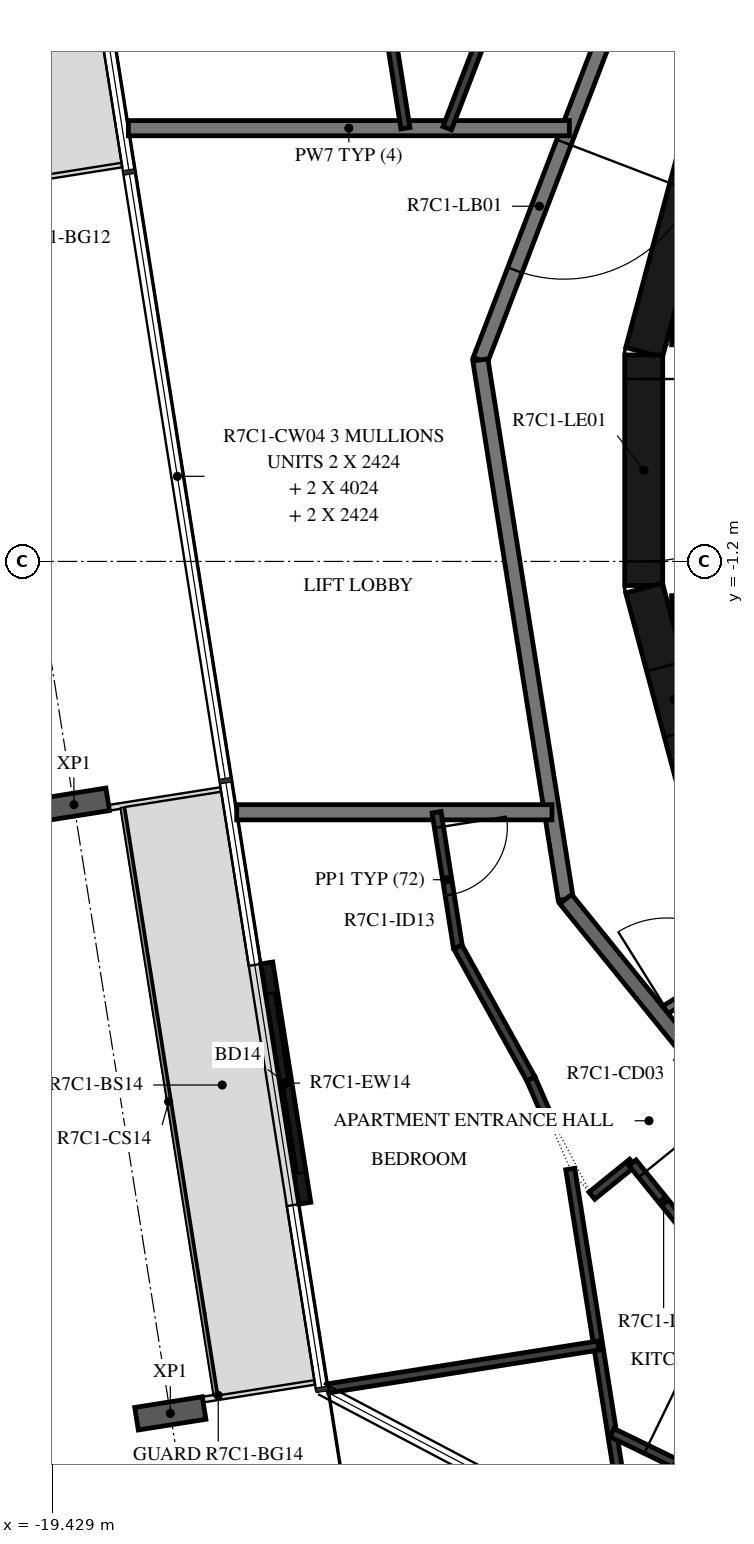
"""IFC4 building model, lengths in metres.
Left out: names, types, materials, properties, quantities, classifications, styles, units other than length and angle.
Written with IfcOpenShell. Run it as: python <this file> out.ifc"""

import sys

from ifc_helpers import new_model, si_unit, direction, frame, frame_2d, origin, origin_2d, place, context, subcontext, project, spatial, rectangle, i_section, extrude, element, fill, save


model = new_model("IFC4")
c1 = context("Model", 3, precision=1e-05, world=origin(), true_north=direction((0.0, 1.0)))
c2 = subcontext(c1, "Body", "Model", "MODEL_VIEW")
j1 = project(units=[si_unit("LENGTHUNIT", "METRE"), si_unit("PLANEANGLEUNIT", "RADIAN")], contexts=[c1])
p1 = place(None, origin())
s1 = spatial("IfcSite", under=j1, at=p1, CompositionType="ELEMENT")
p2 = place(p1, origin())
s2 = spatial("IfcBuilding", under=s1, at=p2, CompositionType="ELEMENT")
p3 = place(p2, frame((0.0, 0.0, 287.9)))
s3 = spatial("IfcBuildingStorey", under=s2, at=p3, CompositionType="ELEMENT", Elevation=287.9)
for number, where, z_axis, x_axis in (
    (1, (-19.144, -4.4, -0.38), (0.0, 0.0, 1.0), (-0.156, 0.988, 0.0)),
    (2, (-17.875, -12.408, -0.38), (0.0, 0.0, 1.0), (-0.156, 0.988, 0.0)),
):
    element("IfcColumn", number, at=place(p3, frame(where, z_axis=z_axis, x_axis=x_axis)), inside=s3, PredefinedType="COLUMN", context=c2, shape_type="SweptSolid", body=[
        extrude(i_section(OverallWidth=0.3, OverallDepth=0.9, WebThickness=0.019, FlangeThickness=0.035, FilletRadius=0.03, at=origin_2d()), origin(), (0.0, 0.0, 1.0), 2.616),
    ])
p4 = place(p3, frame((-16.607, -6.483, 0.0), z_axis=(0.0, 0.0, 1.0), x_axis=(0.156401347891, -0.987693585267, 0.0)))
e3 = element("IfcWall", 3, at=p4, inside=s3, PredefinedType="STANDARD", context=c2, shape_type="SweptSolid", body=[
    extrude(rectangle(XDim=3.2, YDim=0.16, at=frame_2d((1.6, 0.0))), origin(), (0.0, 0.0, 1.0), 3.05),
])
p5 = place(p4, frame((0.4, 0.0, 0.0)))
e4 = element("IfcOpeningElement", 4, at=p5, cuts=e3, PredefinedType="OPENING", context=c2, shape_type="SweptSolid", body=[
    extrude(rectangle(XDim=2.4, YDim=2.4, at=frame_2d((1.2, 1.2))), frame((0.0, 0.09, 0.0), z_axis=(0.0, -1.0, 0.0), x_axis=(1.0, 0.0, 0.0)), (0.0, 0.0, 1.0), 0.18),
])
p6 = place(p3, frame((-10.858, 4.479, 0.0), z_axis=(0.0, 0.0, 1.0), x_axis=(-0.258734743916, -0.965948410781, 0.0)))
e5 = element("IfcWall", 5, at=p6, inside=s3, PredefinedType="SHEAR", context=c2, shape_type="SweptSolid", body=[
    extrude(rectangle(XDim=3.033, YDim=0.5, at=frame_2d((1.516, 0.0))), origin(), (0.0, 0.0, 1.0), 3.05),
])
p7 = place(p3, frame((-11.647, 1.516, 0.0), z_axis=(0.0, 0.0, 1.0), x_axis=(0.0, -1.0, 0.0)))
e6 = element("IfcWall", 6, at=p7, inside=s3, PredefinedType="SHEAR", context=c2, shape_type="SweptSolid", body=[
    extrude(rectangle(XDim=3.033, YDim=0.5, at=frame_2d((1.516, 0.0))), origin(), (0.0, 0.0, 1.0), 3.05),
])
p8 = place(p7, frame((0.316, 0.0, 0.0)))
e7 = element("IfcOpeningElement", 7, at=p8, cuts=e6, PredefinedType="OPENING", context=c2, shape_type="SweptSolid", body=[
    extrude(rectangle(XDim=2.4, YDim=2.1, at=frame_2d((1.2, 1.05))), frame((0.0, 0.26, 0.0), z_axis=(0.0, -1.0, 0.0), x_axis=(1.0, 0.0, 0.0)), (0.0, 0.0, 1.0), 0.52),
])
p9 = place(p3, frame((-11.643, -1.55, 0.0), z_axis=(0.0, 0.0, 1.0), x_axis=(0.258734743916, -0.965948410781, 0.0)))
e8 = element("IfcWall", 8, at=p9, inside=s3, PredefinedType="SHEAR", context=c2, shape_type="SweptSolid", body=[
    extrude(rectangle(XDim=3.033, YDim=0.5, at=frame_2d((1.516, 0.0))), origin(), (0.0, 0.0, 1.0), 3.05),
])
p10 = place(p9, frame((1.066, 0.0, 0.0)))
e9 = element("IfcOpeningElement", 9, at=p10, cuts=e8, PredefinedType="OPENING", context=c2, shape_type="SweptSolid", body=[
    extrude(rectangle(XDim=0.9, YDim=2.1, at=frame_2d((0.45, 1.05))), frame((0.0, 0.26, 0.0), z_axis=(0.0, -1.0, 0.0), x_axis=(1.0, 0.0, 0.0)), (0.0, 0.0, 1.0), 0.52),
])
p11 = place(p3, frame((-11.28, 1.775, 0.0), z_axis=(0.0, 0.0, 1.0), x_axis=(1.0, 0.0, 0.0)))
e10 = element("IfcWall", 10, at=p11, inside=s3, PredefinedType="SHEAR", context=c2, shape_type="SweptSolid", body=[
    extrude(rectangle(XDim=14.38, YDim=0.25, at=frame_2d((7.19, 0.0))), origin(), (0.0, 0.0, 1.0), 3.05),
])
p12 = place(p11, frame((3.305, 0.0, 0.0)))
e11 = element("IfcOpeningElement", 11, at=p12, cuts=e10, PredefinedType="OPENING", context=c2, shape_type="SweptSolid", body=[
    extrude(rectangle(XDim=0.9, YDim=2.1, at=frame_2d((0.45, 1.05))), frame((0.0, 0.135, 0.0), z_axis=(0.0, -1.0, 0.0), x_axis=(1.0, 0.0, 0.0)), (0.0, 0.0, 1.0), 0.27),
])
p13 = place(p11, frame((9.755, 0.0, 0.0)))
e12 = element("IfcOpeningElement", 12, at=p13, cuts=e10, PredefinedType="OPENING", context=c2, shape_type="SweptSolid", body=[
    extrude(rectangle(XDim=0.9, YDim=2.1, at=frame_2d((0.45, 1.05))), frame((0.0, 0.135, 0.0), z_axis=(0.0, -1.0, 0.0), x_axis=(1.0, 0.0, 0.0)), (0.0, 0.0, 1.0), 0.27),
])
p14 = place(p3, frame((-11.28, -1.775, 0.0), z_axis=(0.0, 0.0, 1.0), x_axis=(1.0, 0.0, 0.0)))
e13 = element("IfcWall", 13, at=p14, inside=s3, PredefinedType="SHEAR", context=c2, shape_type="SweptSolid", body=[
    extrude(rectangle(XDim=14.38, YDim=0.25, at=frame_2d((7.19, 0.0))), origin(), (0.0, 0.0, 1.0), 3.05),
])
p15 = place(p14, frame((6.43, 0.0, 0.0)))
e14 = element("IfcOpeningElement", 14, at=p15, cuts=e13, PredefinedType="OPENING", context=c2, shape_type="SweptSolid", body=[
    extrude(rectangle(XDim=1.1, YDim=2.1, at=frame_2d((0.55, 1.05))), frame((0.0, 0.135, 0.0), z_axis=(0.0, -1.0, 0.0), x_axis=(1.0, 0.0, 0.0)), (0.0, 0.0, 1.0), 0.27),
])
p16 = place(p14, frame((8.58, 0.0, 0.0)))
e15 = element("IfcOpeningElement", 15, at=p16, cuts=e13, PredefinedType="OPENING", context=c2, shape_type="SweptSolid", body=[
    extrude(rectangle(XDim=1.1, YDim=2.1, at=frame_2d((0.55, 1.05))), frame((0.0, 0.135, 0.0), z_axis=(0.0, -1.0, 0.0), x_axis=(1.0, 0.0, 0.0)), (0.0, 0.0, 1.0), 0.27),
])
p17 = place(p14, frame((10.73, 0.0, 0.0)))
e16 = element("IfcOpeningElement", 16, at=p17, cuts=e13, PredefinedType="OPENING", context=c2, shape_type="SweptSolid", body=[
    extrude(rectangle(XDim=1.1, YDim=2.1, at=frame_2d((0.55, 1.05))), frame((0.0, 0.135, 0.0), z_axis=(0.0, -1.0, 0.0), x_axis=(1.0, 0.0, 0.0)), (0.0, 0.0, 1.0), 0.27),
])
p18 = place(p14, frame((3.305, 0.0, 0.0)))
e17 = element("IfcOpeningElement", 17, at=p18, cuts=e13, PredefinedType="OPENING", context=c2, shape_type="SweptSolid", body=[
    extrude(rectangle(XDim=0.9, YDim=2.1, at=frame_2d((0.45, 1.05))), frame((0.0, 0.135, 0.0), z_axis=(0.0, -1.0, 0.0), x_axis=(1.0, 0.0, 0.0)), (0.0, 0.0, 1.0), 0.27),
])
p19 = place(p14, frame((12.98, 0.0, 0.0)))
e18 = element("IfcOpeningElement", 18, at=p19, cuts=e13, PredefinedType="OPENING", context=c2, shape_type="SweptSolid", body=[
    extrude(rectangle(XDim=0.9, YDim=2.1, at=frame_2d((0.45, 1.05))), frame((0.0, 0.135, 0.0), z_axis=(0.0, -1.0, 0.0), x_axis=(1.0, 0.0, 0.0)), (0.0, 0.0, 1.0), 0.27),
])
p20 = place(p3, frame((-11.449, -7.154, 0.0), z_axis=(0.0, 0.0, 1.0), x_axis=(0.848067047543, 0.529888934468, 0.0)))
e19 = element("IfcWall", 19, at=p20, inside=s3, PredefinedType="PARTITIONING", context=c2, shape_type="SweptSolid", body=[
    extrude(rectangle(XDim=1.596, YDim=0.12, at=frame_2d((0.798, 0.0))), origin(), (0.0, 0.0, 1.0), 3.05),
])
p21 = place(p20, frame((0.12, 0.0, 0.0)))
e20 = element("IfcOpeningElement", 20, at=p21, cuts=e19, PredefinedType="OPENING", context=c2, shape_type="SweptSolid", body=[
    extrude(rectangle(XDim=1.2, YDim=2.1, at=frame_2d((0.6, 1.05))), frame((0.0, 0.07, 0.0), z_axis=(0.0, -1.0, 0.0), x_axis=(1.0, 0.0, 0.0)), (0.0, 0.0, 1.0), 0.14),
])
p22 = place(p3, frame((-11.223, 8.154, 0.0), z_axis=(0.0, 0.0, 1.0), x_axis=(-0.358341090983, -0.93359073609, 0.0)))
e21 = element("IfcWall", 21, at=p22, inside=s3, PredefinedType="STANDARD", context=c2, shape_type="SweptSolid", body=[
    extrude(rectangle(XDim=7.181, YDim=0.2, at=frame_2d((3.59, 0.0))), origin(), (0.0, 0.0, 1.0), 3.05),
])
p23 = place(p22, frame((4.114, 0.0, 0.0)))
e22 = element("IfcOpeningElement", 22, at=p23, cuts=e21, PredefinedType="OPENING", context=c2, shape_type="SweptSolid", body=[
    extrude(rectangle(XDim=1.8, YDim=2.1, at=frame_2d((0.9, 1.05))), frame((0.0, 0.11, 0.0), z_axis=(0.0, -1.0, 0.0), x_axis=(1.0, 0.0, 0.0)), (0.0, 0.0, 1.0), 0.22),
])
p24 = place(p3, frame((-13.797, 1.45, 0.0), z_axis=(0.0, 0.0, 1.0), x_axis=(0.156421704315, -0.987690361611, 0.0)))
e23 = element("IfcWall", 23, at=p24, inside=s3, PredefinedType="STANDARD", context=c2, shape_type="SweptSolid", body=[
    extrude(rectangle(XDim=7.181, YDim=0.2, at=frame_2d((3.591, 0.0))), origin(), (0.0, 0.0, 1.0), 3.05),
])
p25 = place(p3, frame((-12.673, -5.643, 0.0), z_axis=(0.0, 0.0, 1.0), x_axis=(0.629302871585, -0.777160148113, 0.0)))
e24 = element("IfcWall", 24, at=p25, inside=s3, PredefinedType="STANDARD", context=c2, shape_type="SweptSolid", body=[
    extrude(rectangle(XDim=7.181, YDim=0.2, at=frame_2d((3.59, 0.0))), origin(), (0.0, 0.0, 1.0), 3.05),
])
p26 = place(p3, frame((-12.626, 4.5, 0.0), z_axis=(0.0, 0.0, 1.0), x_axis=(-1.0, 0.0, 0.0)))
e25 = element("IfcWall", 25, at=p26, inside=s3, PredefinedType="STANDARD", context=c2, shape_type="SweptSolid", body=[
    extrude(rectangle(XDim=5.802, YDim=0.2, at=frame_2d((2.901, 0.0))), origin(), (0.0, 0.0, 1.0), 3.05),
])
p27 = place(p3, frame((-17.002, -4.5, 0.0), z_axis=(0.0, 0.0, 1.0), x_axis=(1.0, 0.0, 0.0)))
e26 = element("IfcWall", 26, at=p27, inside=s3, PredefinedType="STANDARD", context=c2, shape_type="SweptSolid", body=[
    extrude(rectangle(XDim=4.148, YDim=0.2, at=frame_2d((2.074, 0.0))), origin(), (0.0, 0.0, 1.0), 3.05),
])
p28 = place(p3, frame((-12.479, 9.067, 0.0), z_axis=(0.0, 0.0, 1.0), x_axis=(-0.358387060848, -0.933573090131, 0.0)))
e27 = element("IfcWall", 27, at=p28, inside=s3, PredefinedType="PARTITIONING", context=c2, shape_type="SweptSolid", body=[
    extrude(rectangle(XDim=4.892, YDim=0.12, at=frame_2d((2.446, 0.0))), origin(), (0.0, 0.0, 1.0), 3.05),
])
p29 = place(p3, frame((-16.266, 13.865, 0.0), z_axis=(0.0, 0.0, 1.0), x_axis=(0.156422690833, -0.987690205374, 0.0)))
e28 = element("IfcWall", 28, at=p29, inside=s3, PredefinedType="PARTITIONING", context=c2, shape_type="SweptSolid", body=[
    extrude(rectangle(XDim=9.482, YDim=0.12, at=frame_2d((4.741, 0.0))), origin(), (0.0, 0.0, 1.0), 3.05),
])
p30 = place(p29, frame((3.357, 0.0, 0.0)))
e29 = element("IfcOpeningElement", 29, at=p30, cuts=e28, PredefinedType="OPENING", context=c2, shape_type="SweptSolid", body=[
    extrude(rectangle(XDim=0.9, YDim=2.1, at=frame_2d((0.45, 1.05))), frame((0.0, 0.07, 0.0), z_axis=(0.0, -1.0, 0.0), x_axis=(1.0, 0.0, 0.0)), (0.0, 0.0, 1.0), 0.14),
])
p31 = place(p3, frame((-14.373, -4.5, 0.0), z_axis=(0.0, 0.0, 1.0), x_axis=(0.156437152886, -0.987687914878, 0.0)))
e30 = element("IfcWall", 30, at=p31, inside=s3, PredefinedType="PARTITIONING", context=c2, shape_type="SweptSolid", body=[
    extrude(rectangle(XDim=1.796, YDim=0.12, at=frame_2d((0.898, 0.0))), origin(), (0.0, 0.0, 1.0), 3.05),
])
p32 = place(p31, frame((0.2, 0.0, 0.0)))
e31 = element("IfcOpeningElement", 31, at=p32, cuts=e30, PredefinedType="OPENING", context=c2, shape_type="SweptSolid", body=[
    extrude(rectangle(XDim=0.9, YDim=2.1, at=frame_2d((0.45, 1.05))), frame((0.0, 0.07, 0.0), z_axis=(0.0, -1.0, 0.0), x_axis=(1.0, 0.0, 0.0)), (0.0, 0.0, 1.0), 0.14),
])
p33 = place(p3, frame((-14.092, -6.274, 0.0), z_axis=(0.0, 0.0, 1.0), x_axis=(0.484732033151, -0.87466270987, 0.0)))
e32 = element("IfcWall", 32, at=p33, inside=s3, PredefinedType="PARTITIONING", context=c2, shape_type="SweptSolid", body=[
    extrude(rectangle(XDim=1.98, YDim=0.12, at=frame_2d((0.99, 0.0))), origin(), (0.0, 0.0, 1.0), 3.05),
])
p34 = place(p3, frame((-13.132, -8.006, 0.0), z_axis=(0.0, 0.0, 1.0), x_axis=(0.400176548656, -0.916438066596, 0.0)))
e33 = element("IfcWall", 33, at=p34, inside=s3, PredefinedType="PARTITIONING", context=c2, shape_type="SweptSolid", body=[
    extrude(rectangle(XDim=0.578, YDim=0.12, at=frame_2d((0.289, 0.0))), origin(), (0.0, 0.0, 1.0), 3.05),
])
p35 = place(p3, frame((-12.33, -9.544, 0.0), z_axis=(0.0, 0.0, 1.0), x_axis=(0.777046524115, 0.629443166109, 0.0)))
e34 = element("IfcWall", 34, at=p35, inside=s3, PredefinedType="PARTITIONING", context=c2, shape_type="SweptSolid", body=[
    extrude(rectangle(XDim=0.688, YDim=0.12, at=frame_2d((0.344, 0.0))), origin(), (0.0, 0.0, 1.0), 3.05),
])
p36 = place(p3, frame((-11.795, -9.111, 0.0), z_axis=(0.0, 0.0, 1.0), x_axis=(0.62936834401, -0.777107127466, 0.0)))
e35 = element("IfcWall", 35, at=p36, inside=s3, PredefinedType="PARTITIONING", context=c2, shape_type="SweptSolid", body=[
    extrude(rectangle(XDim=4.334, YDim=0.12, at=frame_2d((2.167, 0.0))), origin(), (0.0, 0.0, 1.0), 3.05),
])
p37 = place(p36, frame((0.2, 0.0, 0.0)))
e36 = element("IfcOpeningElement", 36, at=p37, cuts=e35, PredefinedType="OPENING", context=c2, shape_type="SweptSolid", body=[
    extrude(rectangle(XDim=0.9, YDim=2.1, at=frame_2d((0.45, 1.05))), frame((0.0, 0.07, 0.0), z_axis=(0.0, -1.0, 0.0), x_axis=(1.0, 0.0, 0.0)), (0.0, 0.0, 1.0), 0.14),
])
p38 = place(p3, frame((-11.185, -18.213, 0.0), z_axis=(0.0, 0.0, 1.0), x_axis=(-0.15642108221, 0.987690460134, 0.0)))
e37 = element("IfcWall", 37, at=p38, inside=s3, PredefinedType="PARTITIONING", context=c2, shape_type="SweptSolid", body=[
    extrude(rectangle(XDim=9.132, YDim=0.12, at=frame_2d((4.566, 0.0))), origin(), (0.0, 0.0, 1.0), 3.05),
])
p39 = place(p38, frame((1.781, 0.0, 0.0)))
e38 = element("IfcOpeningElement", 38, at=p39, cuts=e37, PredefinedType="OPENING", context=c2, shape_type="SweptSolid", body=[
    extrude(rectangle(XDim=0.9, YDim=2.1, at=frame_2d((0.45, 1.05))), frame((0.0, 0.07, 0.0), z_axis=(0.0, -1.0, 0.0), x_axis=(1.0, 0.0, 0.0)), (0.0, 0.0, 1.0), 0.14),
])
p40 = place(p3, frame((-15.802, -12.08, 0.0), z_axis=(0.0, 0.0, 1.0), x_axis=(0.987685312069, 0.156453585206, 0.0)))
e39 = element("IfcWall", 39, at=p40, inside=s3, PredefinedType="PARTITIONING", context=c2, shape_type="SweptSolid", body=[
    extrude(rectangle(XDim=3.6, YDim=0.12, at=frame_2d((1.8, 0.0))), origin(), (0.0, 0.0, 1.0), 3.05),
])
p41 = place(p3, frame((-12.064, -12.662, 0.0), z_axis=(0.0, 0.0, 1.0), x_axis=(0.899383852228, -0.437159794985, 0.0)))
e40 = element("IfcWall", 40, at=p41, inside=s3, PredefinedType="PARTITIONING", context=c2, shape_type="SweptSolid", body=[
    extrude(rectangle(XDim=6.75, YDim=0.12, at=frame_2d((3.375, 0.0))), origin(), (0.0, 0.0, 1.0), 3.05),
])
p42 = place(p41, frame((0.5, 0.0, 0.0)))
e41 = element("IfcOpeningElement", 41, at=p42, cuts=e40, PredefinedType="OPENING", context=c2, shape_type="SweptSolid", body=[
    extrude(rectangle(XDim=0.9, YDim=2.1, at=frame_2d((0.45, 1.05))), frame((0.0, 0.07, 0.0), z_axis=(0.0, -1.0, 0.0), x_axis=(1.0, 0.0, 0.0)), (0.0, 0.0, 1.0), 0.14),
])
p43 = place(p5, origin())
e42 = element("IfcDoor", 42, at=p43, inside=s3, OperationType="DOUBLE_DOOR_SLIDING", PredefinedType="DOOR", context=c2, shape_type="SweptSolid", body=[
    extrude(rectangle(XDim=2.4, YDim=2.4, at=frame_2d((1.2, 1.2))), frame((0.0, 0.025, 0.0), z_axis=(0.0, -1.0, 0.0), x_axis=(1.0, 0.0, 0.0)), (0.0, 0.0, 1.0), 0.05),
])
fill(e4, e42)
p44 = place(p8, origin())
e43 = element("IfcDoor", 43, at=p44, inside=s3, OperationType="DOUBLE_DOOR_SINGLE_SWING", PredefinedType="DOOR", context=c2, shape_type="SweptSolid", body=[
    extrude(rectangle(XDim=2.4, YDim=2.1, at=frame_2d((1.2, 1.05))), frame((0.0, 0.025, 0.0), z_axis=(0.0, -1.0, 0.0), x_axis=(1.0, 0.0, 0.0)), (0.0, 0.0, 1.0), 0.05),
])
fill(e7, e43)
p45 = place(p10, origin())
e44 = element("IfcDoor", 44, at=p45, inside=s3, OperationType="SINGLE_SWING_RIGHT", PredefinedType="DOOR", context=c2, shape_type="SweptSolid", body=[
    extrude(rectangle(XDim=0.9, YDim=2.1, at=frame_2d((0.45, 1.05))), frame((0.0, 0.025, 0.0), z_axis=(0.0, -1.0, 0.0), x_axis=(1.0, 0.0, 0.0)), (0.0, 0.0, 1.0), 0.05),
])
fill(e9, e44)
p46 = place(p32, origin())
e45 = element("IfcDoor", 45, at=p46, inside=s3, OperationType="SINGLE_SWING_RIGHT", PredefinedType="DOOR", context=c2, shape_type="SweptSolid", body=[
    extrude(rectangle(XDim=0.9, YDim=2.1, at=frame_2d((0.45, 1.05))), frame((0.0, 0.025, 0.0), z_axis=(0.0, -1.0, 0.0), x_axis=(1.0, 0.0, 0.0)), (0.0, 0.0, 1.0), 0.05),
])
fill(e31, e45)
p47 = place(p37, origin())
e46 = element("IfcDoor", 46, at=p47, inside=s3, OperationType="SINGLE_SWING_RIGHT", PredefinedType="DOOR", context=c2, shape_type="SweptSolid", body=[
    extrude(rectangle(XDim=0.9, YDim=2.1, at=frame_2d((0.45, 1.05))), frame((0.0, 0.025, 0.0), z_axis=(0.0, -1.0, 0.0), x_axis=(1.0, 0.0, 0.0)), (0.0, 0.0, 1.0), 0.05),
])
fill(e36, e46)
p48 = place(p42, origin())
e47 = element("IfcDoor", 47, at=p48, inside=s3, OperationType="SINGLE_SWING_RIGHT", PredefinedType="DOOR", context=c2, shape_type="SweptSolid", body=[
    extrude(rectangle(XDim=0.9, YDim=2.1, at=frame_2d((0.45, 1.05))), frame((0.0, 0.025, 0.0), z_axis=(0.0, -1.0, 0.0), x_axis=(1.0, 0.0, 0.0)), (0.0, 0.0, 1.0), 0.05),
])
fill(e41, e47)
p49 = place(p21, origin())
e48 = element("IfcDoor", 48, at=p49, inside=s3, OperationType="DOUBLE_DOOR_SINGLE_SWING", PredefinedType="DOOR", context=c2, shape_type="SweptSolid", body=[
    extrude(rectangle(XDim=1.2, YDim=2.1, at=frame_2d((0.6, 1.05))), frame((0.0, 0.025, 0.0), z_axis=(0.0, -1.0, 0.0), x_axis=(1.0, 0.0, 0.0)), (0.0, 0.0, 1.0), 0.05),
])
fill(e20, e48)
p50 = place(p23, origin())
e49 = element("IfcDoor", 49, at=p50, inside=s3, OperationType="DOUBLE_DOOR_SINGLE_SWING", PredefinedType="DOOR", context=c2, shape_type="SweptSolid", body=[
    extrude(rectangle(XDim=1.8, YDim=2.1, at=frame_2d((0.9, 1.05))), frame((0.0, 0.025, 0.0), z_axis=(0.0, -1.0, 0.0), x_axis=(1.0, 0.0, 0.0)), (0.0, 0.0, 1.0), 0.05),
])
fill(e22, e49)
save(model, sys.argv[1])
